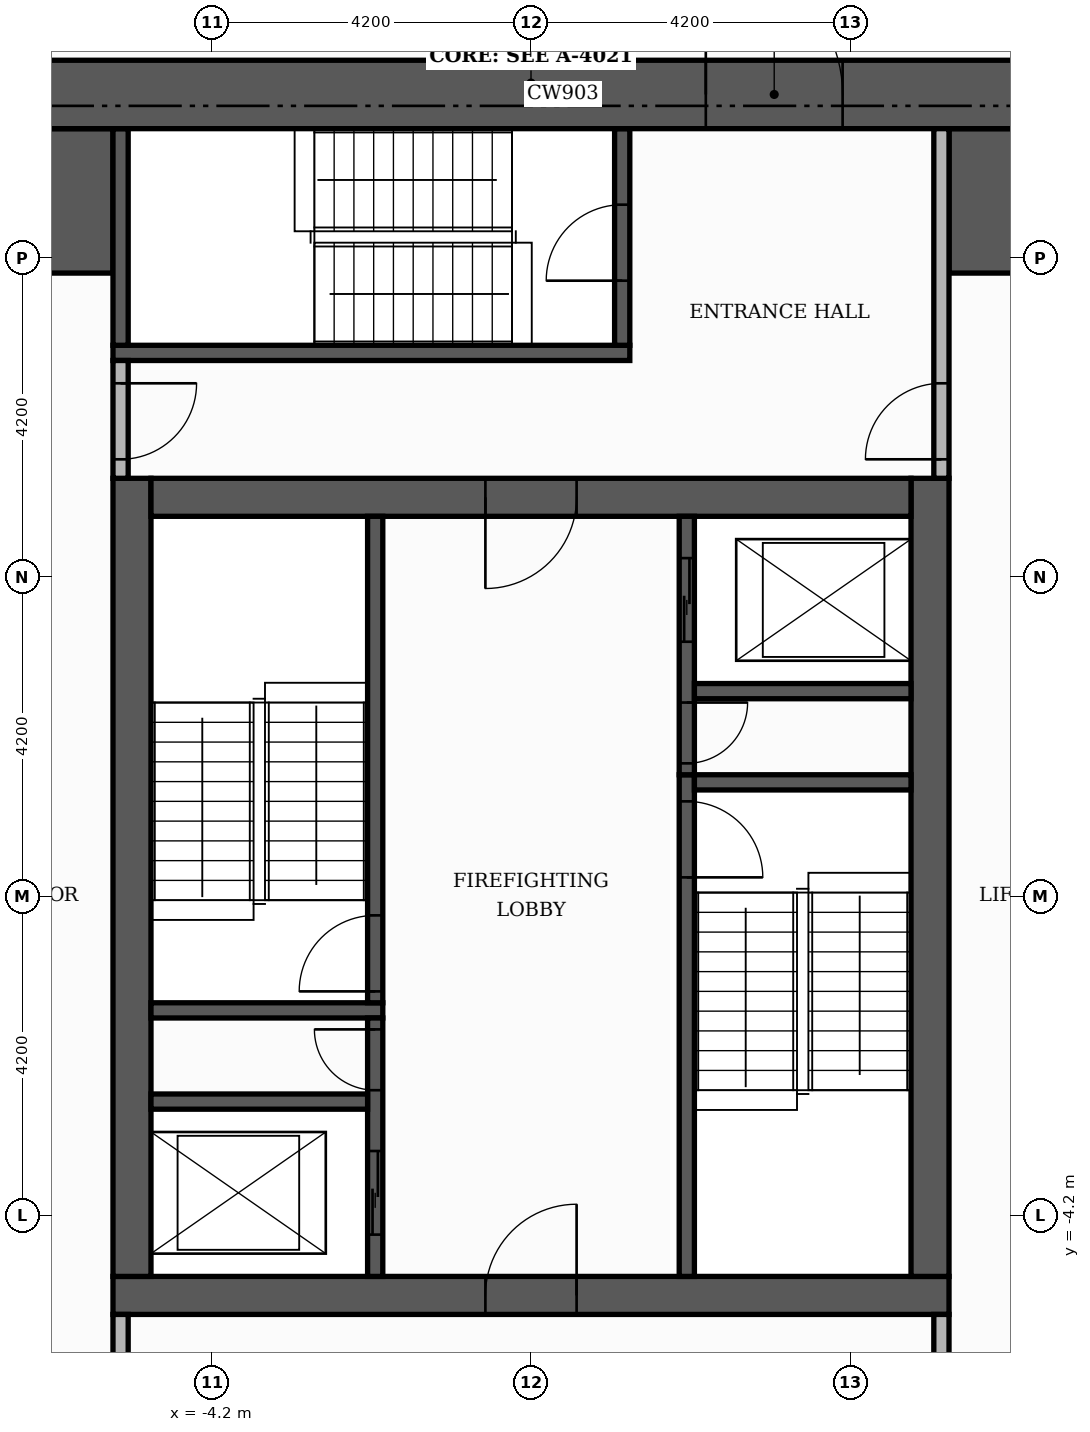
"""IFC4 building model, lengths in metres.
Left out: names, types, materials, properties, quantities, classifications, styles, units other than length and angle.
Written with IfcOpenShell. Run it as: python <this file> out.ifc"""

import sys

from ifc_helpers import new_model, si_unit, direction, frame, frame_2d, origin, place, context, subcontext, project, spatial, rectangle, extrude, element, fill, save


model = new_model("IFC4")
c1 = context("Model", 3, precision=1e-05, world=origin(), true_north=direction((0.0, 1.0)))
c2 = subcontext(c1, "Body", "Model", "MODEL_VIEW")
j1 = project(units=[si_unit("LENGTHUNIT", "METRE"), si_unit("PLANEANGLEUNIT", "RADIAN")], contexts=[c1])
p1 = place(None, origin())
s1 = spatial("IfcSite", under=j1, at=p1, CompositionType="ELEMENT")
p2 = place(p1, origin())
s2 = spatial("IfcBuilding", under=s1, at=p2, CompositionType="ELEMENT")
p3 = place(p2, frame((0.0, 0.0, 133.8)))
s3 = spatial("IfcBuildingStorey", under=s2, at=p3, CompositionType="ELEMENT", Elevation=133.8)
p4 = place(p3, frame((-5.5, -5.25, 0.0), z_axis=(0.0, 0.0, 1.0), x_axis=(1.0, 0.0, 0.0)))
e1 = element("IfcWall", 1, at=p4, inside=s3, PredefinedType="SHEAR", context=c2, shape_type="SweptSolid", body=[
    extrude(rectangle(XDim=11.0, YDim=0.5, at=frame_2d((5.5, 0.0))), origin(), (0.0, 0.0, 1.0), 3.48),
])
p5 = place(p4, frame((4.9, 0.0, 0.0)))
e2 = element("IfcOpeningElement", 2, at=p5, cuts=e1, PredefinedType="OPENING", context=c2, shape_type="SweptSolid", body=[
    extrude(rectangle(XDim=1.2, YDim=2.1, at=frame_2d((0.6, 1.05))), frame((0.0, 0.26, 0.0), z_axis=(0.0, -1.0, 0.0), x_axis=(1.0, 0.0, 0.0)), (0.0, 0.0, 1.0), 0.52),
])
for number, where, z_axis, x_axis in (
    (3, (-5.25, -5.0, 0.0), (0.0, 0.0, 1.0), (0.0, 1.0, 0.0)),
    (4, (5.25, -5.0, 0.0), (0.0, 0.0, 1.0), (0.0, 1.0, 0.0)),
):
    element("IfcWall", number, at=place(p3, frame(where, z_axis=z_axis, x_axis=x_axis)), inside=s3, PredefinedType="SHEAR", context=c2, shape_type="SweptSolid", body=[
        extrude(rectangle(XDim=10.5, YDim=0.5, at=frame_2d((5.25, 0.0))), origin(), (0.0, 0.0, 1.0), 3.48),
    ])
p6 = place(p3, frame((-5.0, 5.25, 0.0), z_axis=(0.0, 0.0, 1.0), x_axis=(1.0, 0.0, 0.0)))
e5 = element("IfcWall", 5, at=p6, inside=s3, PredefinedType="SHEAR", context=c2, shape_type="SweptSolid", body=[
    extrude(rectangle(XDim=10.0, YDim=0.5, at=frame_2d((5.0, 0.0))), origin(), (0.0, 0.0, 1.0), 3.48),
])
p7 = place(p6, frame((4.4, 0.0, 0.0)))
e6 = element("IfcOpeningElement", 6, at=p7, cuts=e5, PredefinedType="OPENING", context=c2, shape_type="SweptSolid", body=[
    extrude(rectangle(XDim=1.2, YDim=2.1, at=frame_2d((0.6, 1.05))), frame((0.0, 0.26, 0.0), z_axis=(0.0, -1.0, 0.0), x_axis=(1.0, 0.0, 0.0)), (0.0, 0.0, 1.0), 0.52),
])
for number, where, z_axis, x_axis in (
    (7, (-10.1, 9.15, 0.0), (0.0, 0.0, 1.0), (1.0, 0.0, 0.0)),
    (8, (5.5, 9.15, 0.0), (0.0, 0.0, 1.0), (1.0, 0.0, 0.0)),
):
    element("IfcWall", number, at=place(p3, frame(where, z_axis=z_axis, x_axis=x_axis)), inside=s3, PredefinedType="SHEAR", context=c2, shape_type="SweptSolid", body=[
        extrude(rectangle(XDim=4.6, YDim=1.9, at=frame_2d((2.3, 0.0))), origin(), (0.0, 0.0, 1.0), 3.48),
    ])
p8 = place(p3, frame((2.05, -5.0, 0.0), z_axis=(0.0, 0.0, 1.0), x_axis=(0.0, 1.0, 0.0)))
e9 = element("IfcWall", 9, at=p8, inside=s3, PredefinedType="SHEAR", context=c2, shape_type="SweptSolid", body=[
    extrude(rectangle(XDim=6.6, YDim=0.2, at=frame_2d((3.3, 0.0))), origin(), (0.0, 0.0, 1.0), 3.48),
])
p9 = place(p8, frame((5.25, 0.0, 0.0)))
e10 = element("IfcOpeningElement", 10, at=p9, cuts=e9, PredefinedType="OPENING", context=c2, shape_type="SweptSolid", body=[
    extrude(rectangle(XDim=1.0, YDim=2.1, at=frame_2d((0.5, 1.05))), frame((0.0, 0.11, 0.0), z_axis=(0.0, -1.0, 0.0), x_axis=(1.0, 0.0, 0.0)), (0.0, 0.0, 1.0), 0.22),
])
p10 = place(p3, frame((-5.0, -1.5, 0.0), z_axis=(0.0, 0.0, 1.0), x_axis=(1.0, 0.0, 0.0)))
e11 = element("IfcWall", 11, at=p10, inside=s3, PredefinedType="SHEAR", context=c2, shape_type="SweptSolid", body=[
    extrude(rectangle(XDim=3.05, YDim=0.2, at=frame_2d((1.525, 0.0))), origin(), (0.0, 0.0, 1.0), 3.48),
])
p11 = place(p3, frame((-2.05, -1.4, 0.0), z_axis=(0.0, 0.0, 1.0), x_axis=(0.0, 1.0, 0.0)))
e12 = element("IfcWall", 12, at=p11, inside=s3, PredefinedType="SHEAR", context=c2, shape_type="SweptSolid", body=[
    extrude(rectangle(XDim=6.4, YDim=0.2, at=frame_2d((3.2, 0.0))), origin(), (0.0, 0.0, 1.0), 3.48),
])
p12 = place(p11, frame((0.15, 0.0, 0.0)))
e13 = element("IfcOpeningElement", 13, at=p12, cuts=e12, PredefinedType="OPENING", context=c2, shape_type="SweptSolid", body=[
    extrude(rectangle(XDim=1.0, YDim=2.1, at=frame_2d((0.5, 1.05))), frame((0.0, 0.11, 0.0), z_axis=(0.0, -1.0, 0.0), x_axis=(1.0, 0.0, 0.0)), (0.0, 0.0, 1.0), 0.22),
])
p13 = place(p3, frame((2.15, 1.5, 0.0), z_axis=(0.0, 0.0, 1.0), x_axis=(1.0, 0.0, 0.0)))
e14 = element("IfcWall", 14, at=p13, inside=s3, PredefinedType="SHEAR", context=c2, shape_type="SweptSolid", body=[
    extrude(rectangle(XDim=2.85, YDim=0.2, at=frame_2d((1.425, 0.0))), origin(), (0.0, 0.0, 1.0), 3.48),
])
p14 = place(p3, frame((-5.5, 7.15, 0.0), z_axis=(0.0, 0.0, 1.0), x_axis=(1.0, 0.0, 0.0)))
e15 = element("IfcWall", 15, at=p14, inside=s3, PredefinedType="SHEAR", context=c2, shape_type="SweptSolid", body=[
    extrude(rectangle(XDim=6.8, YDim=0.2, at=frame_2d((3.4, 0.0))), origin(), (0.0, 0.0, 1.0), 3.48),
])
p15 = place(p3, frame((-5.4, 7.25, 0.0), z_axis=(0.0, 0.0, 1.0), x_axis=(0.0, 1.0, 0.0)))
e16 = element("IfcWall", 16, at=p15, inside=s3, PredefinedType="SHEAR", context=c2, shape_type="SweptSolid", body=[
    extrude(rectangle(XDim=2.85, YDim=0.2, at=frame_2d((1.425, 0.0))), origin(), (0.0, 0.0, 1.0), 3.48),
])
p16 = place(p3, frame((1.2, 7.25, 0.0), z_axis=(0.0, 0.0, 1.0), x_axis=(0.0, 1.0, 0.0)))
e17 = element("IfcWall", 17, at=p16, inside=s3, PredefinedType="SHEAR", context=c2, shape_type="SweptSolid", body=[
    extrude(rectangle(XDim=2.85, YDim=0.2, at=frame_2d((1.425, 0.0))), origin(), (0.0, 0.0, 1.0), 3.48),
])
p17 = place(p16, frame((0.85, 0.0, 0.0)))
e18 = element("IfcOpeningElement", 18, at=p17, cuts=e17, PredefinedType="OPENING", context=c2, shape_type="SweptSolid", body=[
    extrude(rectangle(XDim=1.0, YDim=2.1, at=frame_2d((0.5, 1.05))), frame((0.0, 0.11, 0.0), z_axis=(0.0, -1.0, 0.0), x_axis=(1.0, 0.0, 0.0)), (0.0, 0.0, 1.0), 0.22),
])
p18 = place(p3, frame((-2.05, -5.0, 0.0), z_axis=(0.0, 0.0, 1.0), x_axis=(0.0, 1.0, 0.0)))
e19 = element("IfcWall", 19, at=p18, inside=s3, PredefinedType="SHEAR", context=c2, shape_type="SweptSolid", body=[
    extrude(rectangle(XDim=3.4, YDim=0.2, at=frame_2d((1.7, 0.0))), origin(), (0.0, 0.0, 1.0), 3.48),
])
p19 = place(p18, frame((0.55, 0.0, 0.0)))
e20 = element("IfcOpeningElement", 20, at=p19, cuts=e19, PredefinedType="OPENING", context=c2, shape_type="SweptSolid", body=[
    extrude(rectangle(XDim=1.1, YDim=2.1, at=frame_2d((0.55, 1.05))), frame((0.0, 0.11, 0.0), z_axis=(0.0, -1.0, 0.0), x_axis=(1.0, 0.0, 0.0)), (0.0, 0.0, 1.0), 0.22),
])
p20 = place(p18, frame((2.45, 0.0, 0.0)))
e21 = element("IfcOpeningElement", 21, at=p20, cuts=e19, PredefinedType="OPENING", context=c2, shape_type="SweptSolid", body=[
    extrude(rectangle(XDim=0.8, YDim=2.1, at=frame_2d((0.4, 1.05))), frame((0.0, 0.11, 0.0), z_axis=(0.0, -1.0, 0.0), x_axis=(1.0, 0.0, 0.0)), (0.0, 0.0, 1.0), 0.22),
])
p21 = place(p3, frame((-5.0, -2.7, 0.0), z_axis=(0.0, 0.0, 1.0), x_axis=(1.0, 0.0, 0.0)))
e22 = element("IfcWall", 22, at=p21, inside=s3, PredefinedType="SHEAR", context=c2, shape_type="SweptSolid", body=[
    extrude(rectangle(XDim=2.85, YDim=0.2, at=frame_2d((1.425, 0.0))), origin(), (0.0, 0.0, 1.0), 3.48),
])
p22 = place(p3, frame((2.05, 1.6, 0.0), z_axis=(0.0, 0.0, 1.0), x_axis=(0.0, 1.0, 0.0)))
e23 = element("IfcWall", 23, at=p22, inside=s3, PredefinedType="SHEAR", context=c2, shape_type="SweptSolid", body=[
    extrude(rectangle(XDim=3.4, YDim=0.2, at=frame_2d((1.7, 0.0))), origin(), (0.0, 0.0, 1.0), 3.48),
])
p23 = place(p22, frame((1.75, 0.0, 0.0)))
e24 = element("IfcOpeningElement", 24, at=p23, cuts=e23, PredefinedType="OPENING", context=c2, shape_type="SweptSolid", body=[
    extrude(rectangle(XDim=1.1, YDim=2.1, at=frame_2d((0.55, 1.05))), frame((0.0, 0.11, 0.0), z_axis=(0.0, -1.0, 0.0), x_axis=(1.0, 0.0, 0.0)), (0.0, 0.0, 1.0), 0.22),
])
p24 = place(p22, frame((0.15, 0.0, 0.0)))
e25 = element("IfcOpeningElement", 25, at=p24, cuts=e23, PredefinedType="OPENING", context=c2, shape_type="SweptSolid", body=[
    extrude(rectangle(XDim=0.8, YDim=2.1, at=frame_2d((0.4, 1.05))), frame((0.0, 0.11, 0.0), z_axis=(0.0, -1.0, 0.0), x_axis=(1.0, 0.0, 0.0)), (0.0, 0.0, 1.0), 0.22),
])
p25 = place(p3, frame((2.15, 2.7, 0.0), z_axis=(0.0, 0.0, 1.0), x_axis=(1.0, 0.0, 0.0)))
e26 = element("IfcWall", 26, at=p25, inside=s3, PredefinedType="SHEAR", context=c2, shape_type="SweptSolid", body=[
    extrude(rectangle(XDim=2.85, YDim=0.2, at=frame_2d((1.425, 0.0))), origin(), (0.0, 0.0, 1.0), 3.48),
])
p26 = place(p3, frame((-11.0, 10.55, 0.0), z_axis=(0.0, 0.0, 1.0), x_axis=(1.0, 0.0, 0.0)))
e27 = element("IfcWall", 27, at=p26, inside=s3, PredefinedType="SHEAR", context=c2, shape_type="SweptSolid", body=[
    extrude(rectangle(XDim=22.0, YDim=0.9, at=frame_2d((11.0, 0.0))), origin(), (0.0, 0.0, 1.0), 3.48),
])
p27 = place(p26, frame((13.3, 0.0, 0.0)))
e28 = element("IfcOpeningElement", 28, at=p27, cuts=e27, PredefinedType="OPENING", context=c2, shape_type="SweptSolid", body=[
    extrude(rectangle(XDim=1.8, YDim=2.2, at=frame_2d((0.9, 1.1))), frame((0.0, 0.46, 0.0), z_axis=(0.0, -1.0, 0.0), x_axis=(1.0, 0.0, 0.0)), (0.0, 0.0, 1.0), 0.92),
])
p28 = place(p3, frame((-5.4, -10.1, 0.0), z_axis=(0.0, 0.0, 1.0), x_axis=(0.0, 1.0, 0.0)))
e29 = element("IfcWall", 29, at=p28, inside=s3, PredefinedType="PARTITIONING", context=c2, shape_type="SweptSolid", body=[
    extrude(rectangle(XDim=4.6, YDim=0.2, at=frame_2d((2.3, 0.0))), origin(), (0.0, 0.0, 1.0), 3.48),
])
p29 = place(p28, frame((2.9, 0.0, 0.0)))
e30 = element("IfcOpeningElement", 30, at=p29, cuts=e29, PredefinedType="OPENING", context=c2, shape_type="SweptSolid", body=[
    extrude(rectangle(XDim=1.0, YDim=2.1, at=frame_2d((0.5, 1.05))), frame((0.0, 0.11, 0.0), z_axis=(0.0, -1.0, 0.0), x_axis=(1.0, 0.0, 0.0)), (0.0, 0.0, 1.0), 0.22),
])
p30 = place(p3, frame((5.4, -7.9, 0.0), z_axis=(0.0, 0.0, 1.0), x_axis=(0.0, 1.0, 0.0)))
e31 = element("IfcWall", 31, at=p30, inside=s3, PredefinedType="PARTITIONING", context=c2, shape_type="SweptSolid", body=[
    extrude(rectangle(XDim=2.4, YDim=0.2, at=frame_2d((1.2, 0.0))), origin(), (0.0, 0.0, 1.0), 3.48),
])
p31 = place(p30, frame((0.7, 0.0, 0.0)))
e32 = element("IfcOpeningElement", 32, at=p31, cuts=e31, PredefinedType="OPENING", context=c2, shape_type="SweptSolid", body=[
    extrude(rectangle(XDim=1.0, YDim=2.1, at=frame_2d((0.5, 1.05))), frame((0.0, 0.11, 0.0), z_axis=(0.0, -1.0, 0.0), x_axis=(1.0, 0.0, 0.0)), (0.0, 0.0, 1.0), 0.22),
])
p32 = place(p3, frame((-5.4, 5.5, 0.0), z_axis=(0.0, 0.0, 1.0), x_axis=(0.0, 1.0, 0.0)))
e33 = element("IfcWall", 33, at=p32, inside=s3, PredefinedType="PARTITIONING", context=c2, shape_type="SweptSolid", body=[
    extrude(rectangle(XDim=1.55, YDim=0.2, at=frame_2d((0.775, 0.0))), origin(), (0.0, 0.0, 1.0), 3.48),
])
p33 = place(p32, frame((0.25, 0.0, 0.0)))
e34 = element("IfcOpeningElement", 34, at=p33, cuts=e33, PredefinedType="OPENING", context=c2, shape_type="SweptSolid", body=[
    extrude(rectangle(XDim=1.0, YDim=2.1, at=frame_2d((0.5, 1.05))), frame((0.0, 0.11, 0.0), z_axis=(0.0, -1.0, 0.0), x_axis=(1.0, 0.0, 0.0)), (0.0, 0.0, 1.0), 0.22),
])
p34 = place(p3, frame((5.4, 5.5, 0.0), z_axis=(0.0, 0.0, 1.0), x_axis=(0.0, 1.0, 0.0)))
e35 = element("IfcWall", 35, at=p34, inside=s3, PredefinedType="PARTITIONING", context=c2, shape_type="SweptSolid", body=[
    extrude(rectangle(XDim=4.6, YDim=0.2, at=frame_2d((2.3, 0.0))), origin(), (0.0, 0.0, 1.0), 3.48),
])
p35 = place(p34, frame((0.25, 0.0, 0.0)))
e36 = element("IfcOpeningElement", 36, at=p35, cuts=e35, PredefinedType="OPENING", context=c2, shape_type="SweptSolid", body=[
    extrude(rectangle(XDim=1.0, YDim=2.1, at=frame_2d((0.5, 1.05))), frame((0.0, 0.11, 0.0), z_axis=(0.0, -1.0, 0.0), x_axis=(1.0, 0.0, 0.0)), (0.0, 0.0, 1.0), 0.22),
])
p36 = place(p23, origin())
e37 = element("IfcDoor", 37, at=p36, inside=s3, OperationType="SLIDING_TO_LEFT", PredefinedType="DOOR", context=c2, shape_type="SweptSolid", body=[
    extrude(rectangle(XDim=1.1, YDim=2.1, at=frame_2d((0.55, 1.05))), frame((0.0, 0.025, 0.0), z_axis=(0.0, -1.0, 0.0), x_axis=(1.0, 0.0, 0.0)), (0.0, 0.0, 1.0), 0.05),
])
fill(e24, e37)
p37 = place(p19, origin())
e38 = element("IfcDoor", 38, at=p37, inside=s3, OperationType="SLIDING_TO_LEFT", PredefinedType="DOOR", context=c2, shape_type="SweptSolid", body=[
    extrude(rectangle(XDim=1.1, YDim=2.1, at=frame_2d((0.55, 1.05))), frame((0.0, 0.025, 0.0), z_axis=(0.0, -1.0, 0.0), x_axis=(1.0, 0.0, 0.0)), (0.0, 0.0, 1.0), 0.05),
])
fill(e20, e38)
p38 = place(p12, origin())
e39 = element("IfcDoor", 39, at=p38, inside=s3, OperationType="SINGLE_SWING_LEFT", PredefinedType="DOOR", context=c2, shape_type="SweptSolid", body=[
    extrude(rectangle(XDim=1.0, YDim=2.1, at=frame_2d((0.5, 1.05))), frame((0.0, 0.025, 0.0), z_axis=(0.0, -1.0, 0.0), x_axis=(1.0, 0.0, 0.0)), (0.0, 0.0, 1.0), 0.05),
])
fill(e13, e39)
p39 = place(p9, frame((1.0, 0.0, 0.0), z_axis=(0.0, 0.0, 1.0), x_axis=(-1.0, 0.0, 0.0)))
e40 = element("IfcDoor", 40, at=p39, inside=s3, OperationType="SINGLE_SWING_LEFT", PredefinedType="DOOR", context=c2, shape_type="SweptSolid", body=[
    extrude(rectangle(XDim=1.0, YDim=2.1, at=frame_2d((0.5, 1.05))), frame((0.0, 0.025, 0.0), z_axis=(0.0, -1.0, 0.0), x_axis=(1.0, 0.0, 0.0)), (0.0, 0.0, 1.0), 0.05),
])
fill(e10, e40)
p40 = place(p24, frame((0.8, 0.0, 0.0), z_axis=(0.0, 0.0, 1.0), x_axis=(-1.0, 0.0, 0.0)))
e41 = element("IfcDoor", 41, at=p40, inside=s3, OperationType="SINGLE_SWING_RIGHT", PredefinedType="DOOR", context=c2, shape_type="SweptSolid", body=[
    extrude(rectangle(XDim=0.8, YDim=2.1, at=frame_2d((0.4, 1.05))), frame((0.0, 0.025, 0.0), z_axis=(0.0, -1.0, 0.0), x_axis=(1.0, 0.0, 0.0)), (0.0, 0.0, 1.0), 0.05),
])
fill(e25, e41)
p41 = place(p20, origin())
e42 = element("IfcDoor", 42, at=p41, inside=s3, OperationType="SINGLE_SWING_RIGHT", PredefinedType="DOOR", context=c2, shape_type="SweptSolid", body=[
    extrude(rectangle(XDim=0.8, YDim=2.1, at=frame_2d((0.4, 1.05))), frame((0.0, 0.025, 0.0), z_axis=(0.0, -1.0, 0.0), x_axis=(1.0, 0.0, 0.0)), (0.0, 0.0, 1.0), 0.05),
])
fill(e21, e42)
p42 = place(p7, frame((1.2, 0.0, 0.0), z_axis=(0.0, 0.0, 1.0), x_axis=(-1.0, 0.0, 0.0)))
e43 = element("IfcDoor", 43, at=p42, inside=s3, OperationType="SINGLE_SWING_LEFT", PredefinedType="DOOR", context=c2, shape_type="SweptSolid", body=[
    extrude(rectangle(XDim=1.2, YDim=2.1, at=frame_2d((0.6, 1.05))), frame((0.0, 0.025, 0.0), z_axis=(0.0, -1.0, 0.0), x_axis=(1.0, 0.0, 0.0)), (0.0, 0.0, 1.0), 0.05),
])
fill(e6, e43)
p43 = place(p5, origin())
e44 = element("IfcDoor", 44, at=p43, inside=s3, OperationType="SINGLE_SWING_RIGHT", PredefinedType="DOOR", context=c2, shape_type="SweptSolid", body=[
    extrude(rectangle(XDim=1.2, YDim=2.1, at=frame_2d((0.6, 1.05))), frame((0.0, 0.025, 0.0), z_axis=(0.0, -1.0, 0.0), x_axis=(1.0, 0.0, 0.0)), (0.0, 0.0, 1.0), 0.05),
])
fill(e2, e44)
p44 = place(p17, origin())
e45 = element("IfcDoor", 45, at=p44, inside=s3, OperationType="SINGLE_SWING_LEFT", PredefinedType="DOOR", context=c2, shape_type="SweptSolid", body=[
    extrude(rectangle(XDim=1.0, YDim=2.1, at=frame_2d((0.5, 1.05))), frame((0.0, 0.025, 0.0), z_axis=(0.0, -1.0, 0.0), x_axis=(1.0, 0.0, 0.0)), (0.0, 0.0, 1.0), 0.05),
])
fill(e18, e45)
p45 = place(p33, frame((1.0, 0.0, 0.0), z_axis=(0.0, 0.0, 1.0), x_axis=(-1.0, 0.0, 0.0)))
e46 = element("IfcDoor", 46, at=p45, inside=s3, OperationType="SINGLE_SWING_RIGHT", PredefinedType="DOOR", context=c2, shape_type="SweptSolid", body=[
    extrude(rectangle(XDim=1.0, YDim=2.1, at=frame_2d((0.5, 1.05))), frame((0.0, 0.025, 0.0), z_axis=(0.0, -1.0, 0.0), x_axis=(1.0, 0.0, 0.0)), (0.0, 0.0, 1.0), 0.05),
])
fill(e34, e46)
p46 = place(p35, origin())
e47 = element("IfcDoor", 47, at=p46, inside=s3, OperationType="SINGLE_SWING_LEFT", PredefinedType="DOOR", context=c2, shape_type="SweptSolid", body=[
    extrude(rectangle(XDim=1.0, YDim=2.1, at=frame_2d((0.5, 1.05))), frame((0.0, 0.025, 0.0), z_axis=(0.0, -1.0, 0.0), x_axis=(1.0, 0.0, 0.0)), (0.0, 0.0, 1.0), 0.05),
])
fill(e36, e47)
p47 = place(p27, origin())
e48 = element("IfcDoor", 48, at=p47, inside=s3, OperationType="DOUBLE_DOOR_SINGLE_SWING", PredefinedType="DOOR", context=c2, shape_type="SweptSolid", body=[
    extrude(rectangle(XDim=1.8, YDim=2.2, at=frame_2d((0.9, 1.1))), frame((0.0, 0.025, 0.0), z_axis=(0.0, -1.0, 0.0), x_axis=(1.0, 0.0, 0.0)), (0.0, 0.0, 1.0), 0.05),
])
fill(e28, e48)
save(model, sys.argv[1])
